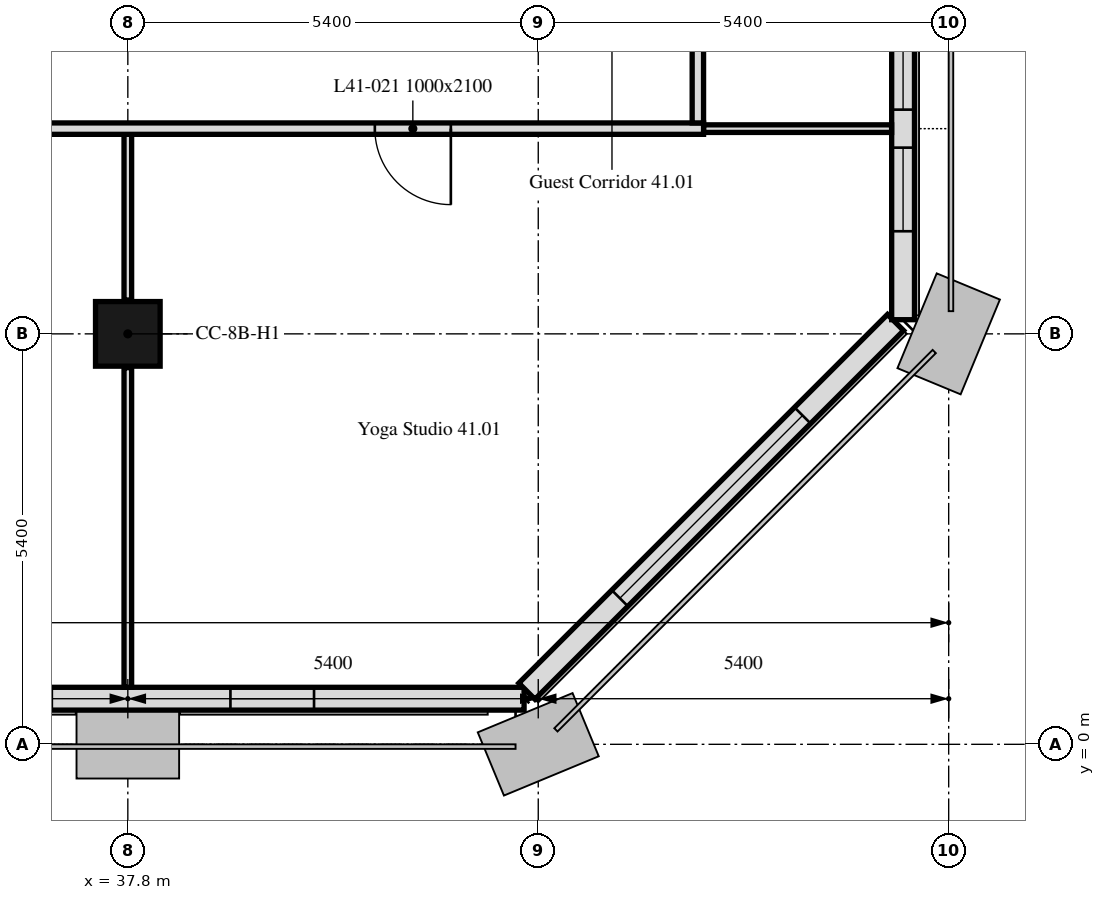
"""IFC4 building model, lengths in metres.
Left out: names, types, materials, properties, quantities, classifications, styles, units other than length and angle.
Written with IfcOpenShell. Run it as: python <this file> out.ifc"""

import sys

from ifc_helpers import new_model, si_unit, direction, frame, frame_2d, origin, origin_2d, place, context, subcontext, project, spatial, rectangle, extrude, element, fill, save


model = new_model("IFC4")
c1 = context("Model", 3, precision=1e-05, world=origin(), true_north=direction((0.0, 1.0)))
c2 = subcontext(c1, "Body", "Model", "MODEL_VIEW")
j1 = project(units=[si_unit("LENGTHUNIT", "METRE"), si_unit("PLANEANGLEUNIT", "RADIAN")], contexts=[c1])
p1 = place(None, origin())
s1 = spatial("IfcSite", under=j1, at=p1, CompositionType="ELEMENT")
p2 = place(p1, origin())
s2 = spatial("IfcBuilding", under=s1, at=p2, CompositionType="ELEMENT")
p3 = place(p2, frame((0.0, 0.0, 172.6)))
s3 = spatial("IfcBuildingStorey", under=s2, at=p3, CompositionType="ELEMENT", Elevation=172.6)
p4 = place(p3, frame((37.8, 5.4, 0.0), z_axis=(0.0, 0.0, 1.0), x_axis=(1.0, 0.0, 0.0)))
e1 = element("IfcColumn", 1, at=p4, inside=s3, PredefinedType="COLUMN", context=c2, shape_type="SweptSolid", body=[
    extrude(rectangle(XDim=0.85, YDim=0.85, at=origin_2d()), origin(), (0.0, 0.0, 1.0), 2.8),
])
p5 = place(p3, frame((10.986, 0.6, 0.0), z_axis=(0.0, 0.0, 1.0), x_axis=(1.0, 0.0, 0.0)))
e2 = element("IfcWall", 2, at=p5, inside=s3, PredefinedType="SOLIDWALL", context=c2, shape_type="SweptSolid", body=[
    extrude(rectangle(XDim=32.027, YDim=0.3, at=frame_2d((16.014, 0.0))), origin(), (0.0, 0.0, 1.0), 2.8),
])
p6 = place(p5, frame((0.814, 0.0, 0.9)))
e3 = element("IfcOpeningElement", 3, at=p6, cuts=e2, PredefinedType="OPENING", context=c2, shape_type="SweptSolid", body=[
    extrude(rectangle(XDim=3.4, YDim=1.7, at=frame_2d((1.7, 0.85))), frame((0.0, 0.16, 0.0), z_axis=(0.0, -1.0, 0.0), x_axis=(1.0, 0.0, 0.0)), (0.0, 0.0, 1.0), 0.32),
])
p7 = place(p5, frame((6.564, 0.0, 0.9)))
e4 = element("IfcOpeningElement", 4, at=p7, cuts=e2, PredefinedType="OPENING", context=c2, shape_type="SweptSolid", body=[
    extrude(rectangle(XDim=1.1, YDim=1.7, at=frame_2d((0.55, 0.85))), frame((0.0, 0.16, 0.0), z_axis=(0.0, -1.0, 0.0), x_axis=(1.0, 0.0, 0.0)), (0.0, 0.0, 1.0), 0.32),
])
p8 = place(p5, frame((11.614, 0.0, 0.9)))
e5 = element("IfcOpeningElement", 5, at=p8, cuts=e2, PredefinedType="OPENING", context=c2, shape_type="SweptSolid", body=[
    extrude(rectangle(XDim=3.4, YDim=1.7, at=frame_2d((1.7, 0.85))), frame((0.0, 0.16, 0.0), z_axis=(0.0, -1.0, 0.0), x_axis=(1.0, 0.0, 0.0)), (0.0, 0.0, 1.0), 0.32),
])
p9 = place(p5, frame((17.364, 0.0, 0.9)))
e6 = element("IfcOpeningElement", 6, at=p9, cuts=e2, PredefinedType="OPENING", context=c2, shape_type="SweptSolid", body=[
    extrude(rectangle(XDim=1.1, YDim=1.7, at=frame_2d((0.55, 0.85))), frame((0.0, 0.16, 0.0), z_axis=(0.0, -1.0, 0.0), x_axis=(1.0, 0.0, 0.0)), (0.0, 0.0, 1.0), 0.32),
])
p10 = place(p5, frame((22.414, 0.0, 0.9)))
e7 = element("IfcOpeningElement", 7, at=p10, cuts=e2, PredefinedType="OPENING", context=c2, shape_type="SweptSolid", body=[
    extrude(rectangle(XDim=3.4, YDim=1.7, at=frame_2d((1.7, 0.85))), frame((0.0, 0.16, 0.0), z_axis=(0.0, -1.0, 0.0), x_axis=(1.0, 0.0, 0.0)), (0.0, 0.0, 1.0), 0.32),
])
p11 = place(p5, frame((28.164, 0.0, 0.9)))
e8 = element("IfcOpeningElement", 8, at=p11, cuts=e2, PredefinedType="OPENING", context=c2, shape_type="SweptSolid", body=[
    extrude(rectangle(XDim=1.1, YDim=1.7, at=frame_2d((0.55, 0.85))), frame((0.0, 0.16, 0.0), z_axis=(0.0, -1.0, 0.0), x_axis=(1.0, 0.0, 0.0)), (0.0, 0.0, 1.0), 0.32),
])
p12 = place(p3, frame((43.051, 0.699, 0.0), z_axis=(0.0, 0.0, 1.0), x_axis=(0.707106781187, 0.707106781187, 0.0)))
e9 = element("IfcWall", 9, at=p12, inside=s3, PredefinedType="SOLIDWALL", context=c2, shape_type="SweptSolid", body=[
    extrude(rectangle(XDim=6.86, YDim=0.3, at=frame_2d((3.43, 0.0))), origin(), (0.0, 0.0, 1.0), 2.8),
])
p13 = place(p12, frame((1.73, 0.0, 0.9)))
e10 = element("IfcOpeningElement", 10, at=p13, cuts=e9, PredefinedType="OPENING", context=c2, shape_type="SweptSolid", body=[
    extrude(rectangle(XDim=3.4, YDim=1.7, at=frame_2d((1.7, 0.85))), frame((0.0, 0.16, 0.0), z_axis=(0.0, -1.0, 0.0), x_axis=(1.0, 0.0, 0.0)), (0.0, 0.0, 1.0), 0.32),
])
p14 = place(p3, frame((48.0, 5.586, 0.0), z_axis=(0.0, 0.0, 1.0), x_axis=(0.0, 1.0, 0.0)))
e11 = element("IfcWall", 11, at=p14, inside=s3, PredefinedType="SOLIDWALL", context=c2, shape_type="SweptSolid", body=[
    extrude(rectangle(XDim=32.027, YDim=0.3, at=frame_2d((16.014, 0.0))), origin(), (0.0, 0.0, 1.0), 2.8),
])
p15 = place(p14, frame((1.164, 0.0, 0.9)))
e12 = element("IfcOpeningElement", 12, at=p15, cuts=e11, PredefinedType="OPENING", context=c2, shape_type="SweptSolid", body=[
    extrude(rectangle(XDim=1.1, YDim=1.7, at=frame_2d((0.55, 0.85))), frame((0.0, 0.16, 0.0), z_axis=(0.0, -1.0, 0.0), x_axis=(1.0, 0.0, 0.0)), (0.0, 0.0, 1.0), 0.32),
])
p16 = place(p14, frame((2.764, 0.0, 0.9)))
e13 = element("IfcOpeningElement", 13, at=p16, cuts=e11, PredefinedType="OPENING", context=c2, shape_type="SweptSolid", body=[
    extrude(rectangle(XDim=1.1, YDim=1.7, at=frame_2d((0.55, 0.85))), frame((0.0, 0.16, 0.0), z_axis=(0.0, -1.0, 0.0), x_axis=(1.0, 0.0, 0.0)), (0.0, 0.0, 1.0), 0.32),
])
p17 = place(p14, frame((6.564, 0.0, 0.9)))
e14 = element("IfcOpeningElement", 14, at=p17, cuts=e11, PredefinedType="OPENING", context=c2, shape_type="SweptSolid", body=[
    extrude(rectangle(XDim=1.1, YDim=1.7, at=frame_2d((0.55, 0.85))), frame((0.0, 0.16, 0.0), z_axis=(0.0, -1.0, 0.0), x_axis=(1.0, 0.0, 0.0)), (0.0, 0.0, 1.0), 0.32),
])
p18 = place(p14, frame((8.164, 0.0, 0.9)))
e15 = element("IfcOpeningElement", 15, at=p18, cuts=e11, PredefinedType="OPENING", context=c2, shape_type="SweptSolid", body=[
    extrude(rectangle(XDim=1.1, YDim=1.7, at=frame_2d((0.55, 0.85))), frame((0.0, 0.16, 0.0), z_axis=(0.0, -1.0, 0.0), x_axis=(1.0, 0.0, 0.0)), (0.0, 0.0, 1.0), 0.32),
])
p19 = place(p14, frame((11.614, 0.0, 0.9)))
e16 = element("IfcOpeningElement", 16, at=p19, cuts=e11, PredefinedType="OPENING", context=c2, shape_type="SweptSolid", body=[
    extrude(rectangle(XDim=3.4, YDim=1.7, at=frame_2d((1.7, 0.85))), frame((0.0, 0.16, 0.0), z_axis=(0.0, -1.0, 0.0), x_axis=(1.0, 0.0, 0.0)), (0.0, 0.0, 1.0), 0.32),
])
p20 = place(p14, frame((17.364, 0.0, 0.9)))
e17 = element("IfcOpeningElement", 17, at=p20, cuts=e11, PredefinedType="OPENING", context=c2, shape_type="SweptSolid", body=[
    extrude(rectangle(XDim=1.1, YDim=1.7, at=frame_2d((0.55, 0.85))), frame((0.0, 0.16, 0.0), z_axis=(0.0, -1.0, 0.0), x_axis=(1.0, 0.0, 0.0)), (0.0, 0.0, 1.0), 0.32),
])
p21 = place(p14, frame((18.964, 0.0, 0.9)))
e18 = element("IfcOpeningElement", 18, at=p21, cuts=e11, PredefinedType="OPENING", context=c2, shape_type="SweptSolid", body=[
    extrude(rectangle(XDim=1.1, YDim=1.7, at=frame_2d((0.55, 0.85))), frame((0.0, 0.16, 0.0), z_axis=(0.0, -1.0, 0.0), x_axis=(1.0, 0.0, 0.0)), (0.0, 0.0, 1.0), 0.32),
])
p22 = place(p14, frame((22.414, 0.0, 0.9)))
e19 = element("IfcOpeningElement", 19, at=p22, cuts=e11, PredefinedType="OPENING", context=c2, shape_type="SweptSolid", body=[
    extrude(rectangle(XDim=3.4, YDim=1.7, at=frame_2d((1.7, 0.85))), frame((0.0, 0.16, 0.0), z_axis=(0.0, -1.0, 0.0), x_axis=(1.0, 0.0, 0.0)), (0.0, 0.0, 1.0), 0.32),
])
p23 = place(p14, frame((28.164, 0.0, 0.9)))
e20 = element("IfcOpeningElement", 20, at=p23, cuts=e11, PredefinedType="OPENING", context=c2, shape_type="SweptSolid", body=[
    extrude(rectangle(XDim=1.1, YDim=1.7, at=frame_2d((0.55, 0.85))), frame((0.0, 0.16, 0.0), z_axis=(0.0, -1.0, 0.0), x_axis=(1.0, 0.0, 0.0)), (0.0, 0.0, 1.0), 0.32),
])
p24 = place(p14, frame((29.764, 0.0, 0.9)))
e21 = element("IfcOpeningElement", 21, at=p24, cuts=e11, PredefinedType="OPENING", context=c2, shape_type="SweptSolid", body=[
    extrude(rectangle(XDim=1.1, YDim=1.7, at=frame_2d((0.55, 0.85))), frame((0.0, 0.16, 0.0), z_axis=(0.0, -1.0, 0.0), x_axis=(1.0, 0.0, 0.0)), (0.0, 0.0, 1.0), 0.32),
])
p25 = place(p3, frame((45.375, 8.1, 0.0), z_axis=(0.0, 0.0, 1.0), x_axis=(1.0, 0.0, 0.0)))
e22 = element("IfcWall", 22, at=p25, inside=s3, PredefinedType="PARTITIONING", context=c2, shape_type="SweptSolid", body=[
    extrude(rectangle(XDim=2.474, YDim=0.1, at=frame_2d((1.237, 0.0))), origin(), (0.0, 0.0, 1.0), 2.8),
])
p26 = place(p3, frame((37.8, 0.751, 0.0), z_axis=(0.0, 0.0, 1.0), x_axis=(0.0, 1.0, 0.0)))
e23 = element("IfcWall", 23, at=p26, inside=s3, PredefinedType="PARTITIONING", context=c2, shape_type="SweptSolid", body=[
    extrude(rectangle(XDim=4.204, YDim=0.1, at=frame_2d((2.102, 0.0))), origin(), (0.0, 0.0, 1.0), 2.2),
])
p27 = place(p3, frame((37.8, 5.845, 0.0), z_axis=(0.0, 0.0, 1.0), x_axis=(0.0, 1.0, 0.0)))
e24 = element("IfcWall", 24, at=p27, inside=s3, PredefinedType="PARTITIONING", context=c2, shape_type="SweptSolid", body=[
    extrude(rectangle(XDim=2.18, YDim=0.1, at=frame_2d((1.09, 0.0))), origin(), (0.0, 0.0, 1.0), 2.2),
])
p28 = place(p3, frame((45.375, 8.1, 0.0), z_axis=(0.0, 0.0, 1.0), x_axis=(-1.0, 0.0, 0.0)))
e25 = element("IfcWall", 25, at=p28, inside=s3, PredefinedType="PARTITIONING", context=c2, shape_type="SweptSolid", body=[
    extrude(rectangle(XDim=39.224, YDim=0.15, at=frame_2d((19.612, 0.0))), origin(), (0.0, 0.0, 1.0), 2.2),
])
p29 = place(p28, frame((36.775, 0.0, 0.0)))
e26 = element("IfcOpeningElement", 26, at=p29, cuts=e25, PredefinedType="OPENING", context=c2, shape_type="SweptSolid", body=[
    extrude(rectangle(XDim=1.0, YDim=2.1, at=frame_2d((0.5, 1.05))), frame((0.0, 0.075, 0.0), z_axis=(0.0, -1.0, 0.0), x_axis=(1.0, 0.0, 0.0)), (0.0, 0.0, 1.0), 0.15),
])
p30 = place(p28, frame((31.375, 0.0, 0.0)))
e27 = element("IfcOpeningElement", 27, at=p30, cuts=e25, PredefinedType="OPENING", context=c2, shape_type="SweptSolid", body=[
    extrude(rectangle(XDim=1.0, YDim=2.1, at=frame_2d((0.5, 1.05))), frame((0.0, 0.075, 0.0), z_axis=(0.0, -1.0, 0.0), x_axis=(1.0, 0.0, 0.0)), (0.0, 0.0, 1.0), 0.15),
])
p31 = place(p28, frame((25.975, 0.0, 0.0)))
e28 = element("IfcOpeningElement", 28, at=p31, cuts=e25, PredefinedType="OPENING", context=c2, shape_type="SweptSolid", body=[
    extrude(rectangle(XDim=1.0, YDim=2.1, at=frame_2d((0.5, 1.05))), frame((0.0, 0.075, 0.0), z_axis=(0.0, -1.0, 0.0), x_axis=(1.0, 0.0, 0.0)), (0.0, 0.0, 1.0), 0.15),
])
p32 = place(p28, frame((20.575, 0.0, 0.0)))
e29 = element("IfcOpeningElement", 29, at=p32, cuts=e25, PredefinedType="OPENING", context=c2, shape_type="SweptSolid", body=[
    extrude(rectangle(XDim=1.0, YDim=2.1, at=frame_2d((0.5, 1.05))), frame((0.0, 0.075, 0.0), z_axis=(0.0, -1.0, 0.0), x_axis=(1.0, 0.0, 0.0)), (0.0, 0.0, 1.0), 0.15),
])
p33 = place(p28, frame((15.175, 0.0, 0.0)))
e30 = element("IfcOpeningElement", 30, at=p33, cuts=e25, PredefinedType="OPENING", context=c2, shape_type="SweptSolid", body=[
    extrude(rectangle(XDim=1.0, YDim=2.1, at=frame_2d((0.5, 1.05))), frame((0.0, 0.075, 0.0), z_axis=(0.0, -1.0, 0.0), x_axis=(1.0, 0.0, 0.0)), (0.0, 0.0, 1.0), 0.15),
])
p34 = place(p28, frame((9.775, 0.0, 0.0)))
e31 = element("IfcOpeningElement", 31, at=p34, cuts=e25, PredefinedType="OPENING", context=c2, shape_type="SweptSolid", body=[
    extrude(rectangle(XDim=1.0, YDim=2.1, at=frame_2d((0.5, 1.05))), frame((0.0, 0.075, 0.0), z_axis=(0.0, -1.0, 0.0), x_axis=(1.0, 0.0, 0.0)), (0.0, 0.0, 1.0), 0.15),
])
p35 = place(p28, frame((3.325, 0.0, 0.0)))
e32 = element("IfcOpeningElement", 32, at=p35, cuts=e25, PredefinedType="OPENING", context=c2, shape_type="SweptSolid", body=[
    extrude(rectangle(XDim=1.0, YDim=2.1, at=frame_2d((0.5, 1.05))), frame((0.0, 0.075, 0.0), z_axis=(0.0, -1.0, 0.0), x_axis=(1.0, 0.0, 0.0)), (0.0, 0.0, 1.0), 0.15),
])
p36 = place(p3, frame((45.3, 21.525, 0.0), z_axis=(0.0, 0.0, 1.0), x_axis=(0.0, -1.0, 0.0)))
e33 = element("IfcWall", 33, at=p36, inside=s3, PredefinedType="PARTITIONING", context=c2, shape_type="SweptSolid", body=[
    extrude(rectangle(XDim=13.35, YDim=0.15, at=frame_2d((6.675, 0.0))), origin(), (0.0, 0.0, 1.0), 2.2),
])
p37 = place(p36, frame((8.063, 0.0, 0.0)))
e34 = element("IfcOpeningElement", 34, at=p37, cuts=e33, PredefinedType="OPENING", context=c2, shape_type="SweptSolid", body=[
    extrude(rectangle(XDim=1.0, YDim=2.1, at=frame_2d((0.5, 1.05))), frame((0.0, 0.075, 0.0), z_axis=(0.0, -1.0, 0.0), x_axis=(1.0, 0.0, 0.0)), (0.0, 0.0, 1.0), 0.15),
])
p38 = place(p36, frame((2.125, 0.0, 0.0)))
e35 = element("IfcOpeningElement", 35, at=p38, cuts=e33, PredefinedType="OPENING", context=c2, shape_type="SweptSolid", body=[
    extrude(rectangle(XDim=1.0, YDim=2.1, at=frame_2d((0.5, 1.05))), frame((0.0, 0.075, 0.0), z_axis=(0.0, -1.0, 0.0), x_axis=(1.0, 0.0, 0.0)), (0.0, 0.0, 1.0), 0.15),
])
p39 = place(p11, origin())
e36 = element("IfcWindow", 36, at=p39, inside=s3, PartitioningType="SINGLE_PANEL", PredefinedType="WINDOW", context=c2, shape_type="SweptSolid", body=[
    extrude(rectangle(XDim=1.1, YDim=1.7, at=frame_2d((0.55, 0.85))), frame((0.0, 0.03, 0.0), z_axis=(0.0, -1.0, 0.0), x_axis=(1.0, 0.0, 0.0)), (0.0, 0.0, 1.0), 0.06),
])
fill(e8, e36)
p40 = place(p13, origin())
e37 = element("IfcWindow", 37, at=p40, inside=s3, PartitioningType="SINGLE_PANEL", PredefinedType="WINDOW", context=c2, shape_type="SweptSolid", body=[
    extrude(rectangle(XDim=3.4, YDim=1.7, at=frame_2d((1.7, 0.85))), frame((0.0, 0.03, 0.0), z_axis=(0.0, -1.0, 0.0), x_axis=(1.0, 0.0, 0.0)), (0.0, 0.0, 1.0), 0.06),
])
fill(e10, e37)
p41 = place(p15, origin())
e38 = element("IfcWindow", 38, at=p41, inside=s3, PartitioningType="SINGLE_PANEL", PredefinedType="WINDOW", context=c2, shape_type="SweptSolid", body=[
    extrude(rectangle(XDim=1.1, YDim=1.7, at=frame_2d((0.55, 0.85))), frame((0.0, 0.03, 0.0), z_axis=(0.0, -1.0, 0.0), x_axis=(1.0, 0.0, 0.0)), (0.0, 0.0, 1.0), 0.06),
])
fill(e12, e38)
p42 = place(p16, origin())
e39 = element("IfcWindow", 39, at=p42, inside=s3, PartitioningType="SINGLE_PANEL", PredefinedType="WINDOW", context=c2, shape_type="SweptSolid", body=[
    extrude(rectangle(XDim=1.1, YDim=1.7, at=frame_2d((0.55, 0.85))), frame((0.0, 0.03, 0.0), z_axis=(0.0, -1.0, 0.0), x_axis=(1.0, 0.0, 0.0)), (0.0, 0.0, 1.0), 0.06),
])
fill(e13, e39)
p43 = place(p35, origin())
e40 = element("IfcDoor", 40, at=p43, inside=s3, OperationType="SINGLE_SWING_LEFT", PredefinedType="DOOR", context=c2, shape_type="SweptSolid", body=[
    extrude(rectangle(XDim=1.0, YDim=2.1, at=frame_2d((0.5, 1.05))), frame((0.0, 0.025, 0.0), z_axis=(0.0, -1.0, 0.0), x_axis=(1.0, 0.0, 0.0)), (0.0, 0.0, 1.0), 0.05),
])
fill(e32, e40)
save(model, sys.argv[1])
